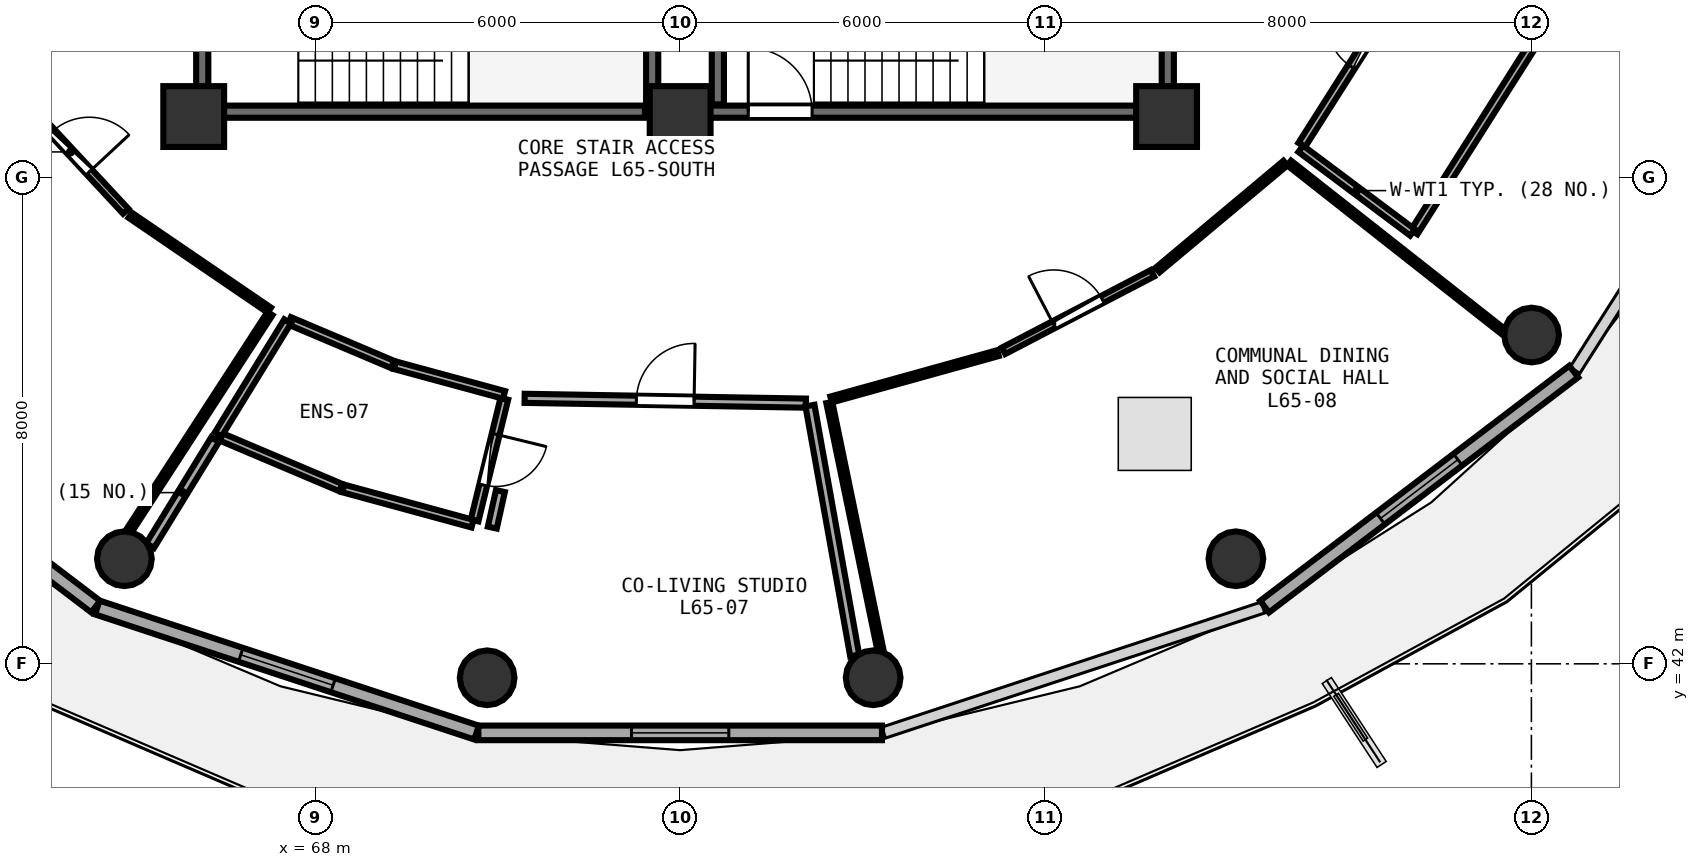
"""IFC4 building model, lengths in metres.
Left out: names, types, materials, properties, quantities, classifications, styles, units other than length and angle.
Written with IfcOpenShell. Run it as: python <this file> out.ifc"""

import sys

from ifc_helpers import new_model, si_unit, direction, frame, frame_2d, origin, origin_2d, place, context, subcontext, project, spatial, rectangle, circle, extrude, element, fill, save


model = new_model("IFC4")
c1 = context("Model", 3, precision=1e-05, world=origin(), true_north=direction((0.0, 1.0)))
c2 = subcontext(c1, "Body", "Model", "MODEL_VIEW")
j1 = project(units=[si_unit("LENGTHUNIT", "METRE"), si_unit("PLANEANGLEUNIT", "RADIAN")], contexts=[c1])
p1 = place(None, origin())
s1 = spatial("IfcSite", under=j1, at=p1, CompositionType="ELEMENT")
p2 = place(p1, origin())
s2 = spatial("IfcBuilding", under=s1, at=p2, CompositionType="ELEMENT")
p3 = place(p2, frame((0.0, 0.0, 256.2)))
s3 = spatial("IfcBuildingStorey", under=s2, at=p3, CompositionType="ELEMENT", Elevation=256.2)
for number, where, z_axis, x_axis in (
    (1, (66.0, 51.0, 0.0), (0.0, 0.0, 1.0), (1.0, 0.0, 0.0)),
    (2, (74.0, 51.0, 0.0), (0.0, 0.0, 1.0), (1.0, 0.0, 0.0)),
    (3, (82.0, 51.0, 0.0), (0.0, 0.0, 1.0), (1.0, 0.0, 0.0)),
):
    element("IfcColumn", number, at=place(p3, frame(where, z_axis=z_axis, x_axis=x_axis)), inside=s3, PredefinedType="PILASTER", context=c2, shape_type="SweptSolid", body=[
        extrude(rectangle(XDim=1.0, YDim=1.0, at=origin_2d()), origin(), (0.0, 0.0, 1.0), 3.75),
    ])
for number, where, z_axis, x_axis in (
    (4, (64.86, 43.728, 0.0), (0.0, 0.0, 1.0), (1.0, 0.0, 0.0)),
    (5, (70.826, 41.771, 0.0), (0.0, 0.0, 1.0), (1.0, 0.0, 0.0)),
    (6, (77.174, 41.771, 0.0), (0.0, 0.0, 1.0), (1.0, 0.0, 0.0)),
    (7, (83.14, 43.728, 0.0), (0.0, 0.0, 1.0), (1.0, 0.0, 0.0)),
    (8, (88.003, 47.407, 0.0), (0.0, 0.0, 1.0), (1.0, 0.0, 0.0)),
):
    element("IfcColumn", number, at=place(p3, frame(where, z_axis=z_axis, x_axis=x_axis)), inside=s3, PredefinedType="COLUMN", context=c2, shape_type="SweptSolid", body=[
        extrude(circle(Radius=0.45, at=origin_2d()), origin(), (0.0, 0.0, 1.0), 3.75),
    ])
p4 = place(p3, frame((59.304, 46.806, 0.0), z_axis=(0.0, 0.0, 1.0), x_axis=(0.796010444211, -0.605282886514, 0.0)))
e9 = element("IfcWall", 9, at=p4, inside=s3, PredefinedType="SOLIDWALL", context=c2, shape_type="SweptSolid", body=[
    extrude(rectangle(XDim=6.387, YDim=0.24, at=frame_2d((3.194, 0.0))), origin(), (0.0, 0.0, 1.0), 3.475),
])
p5 = place(p4, frame((2.394, 0.0, 0.85)))
e10 = element("IfcOpeningElement", 10, at=p5, cuts=e9, PredefinedType="OPENING", context=c2, shape_type="SweptSolid", body=[
    extrude(rectangle(XDim=1.6, YDim=1.45, at=frame_2d((0.8, 0.725))), frame((0.0, 0.13, 0.0), z_axis=(0.0, -1.0, 0.0), x_axis=(1.0, 0.0, 0.0)), (0.0, 0.0, 1.0), 0.26),
])
p6 = place(p3, frame((64.414, 42.927, 0.0), z_axis=(0.0, 0.0, 1.0), x_axis=(0.949663708393, -0.313271193954, 0.0)))
e11 = element("IfcWall", 11, at=p6, inside=s3, PredefinedType="SOLIDWALL", context=c2, shape_type="SweptSolid", body=[
    extrude(rectangle(XDim=6.568, YDim=0.24, at=frame_2d((3.284, 0.0))), origin(), (0.0, 0.0, 1.0), 3.475),
])
p7 = place(p6, frame((2.484, 0.0, 0.85)))
e12 = element("IfcOpeningElement", 12, at=p7, cuts=e11, PredefinedType="OPENING", context=c2, shape_type="SweptSolid", body=[
    extrude(rectangle(XDim=1.6, YDim=1.45, at=frame_2d((0.8, 0.725))), frame((0.0, 0.13, 0.0), z_axis=(0.0, -1.0, 0.0), x_axis=(1.0, 0.0, 0.0)), (0.0, 0.0, 1.0), 0.26),
])
p8 = place(p3, frame((70.681, 40.864, 0.0), z_axis=(0.0, 0.0, 1.0), x_axis=(1.0, 0.0, 0.0)))
e13 = element("IfcWall", 13, at=p8, inside=s3, PredefinedType="SOLIDWALL", context=c2, shape_type="SweptSolid", body=[
    extrude(rectangle(XDim=6.638, YDim=0.24, at=frame_2d((3.319, 0.0))), origin(), (0.0, 0.0, 1.0), 3.475),
])
p9 = place(p8, frame((2.519, 0.0, 0.85)))
e14 = element("IfcOpeningElement", 14, at=p9, cuts=e13, PredefinedType="OPENING", context=c2, shape_type="SweptSolid", body=[
    extrude(rectangle(XDim=1.6, YDim=1.45, at=frame_2d((0.8, 0.725))), frame((0.0, 0.13, 0.0), z_axis=(0.0, -1.0, 0.0), x_axis=(1.0, 0.0, 0.0)), (0.0, 0.0, 1.0), 0.26),
])
p10 = place(p3, frame((83.612, 42.94, 0.0), z_axis=(0.0, 0.0, 1.0), x_axis=(0.796010444211, 0.605282886514, 0.0)))
e15 = element("IfcWall", 15, at=p10, inside=s3, PredefinedType="SOLIDWALL", context=c2, shape_type="SweptSolid", body=[
    extrude(rectangle(XDim=6.387, YDim=0.24, at=frame_2d((3.194, 0.0))), origin(), (0.0, 0.0, 1.0), 3.475),
])
p11 = place(p10, frame((2.394, 0.0, 0.85)))
e16 = element("IfcOpeningElement", 16, at=p11, cuts=e15, PredefinedType="OPENING", context=c2, shape_type="SweptSolid", body=[
    extrude(rectangle(XDim=1.6, YDim=1.45, at=frame_2d((0.8, 0.725))), frame((0.0, 0.13, 0.0), z_axis=(0.0, -1.0, 0.0), x_axis=(1.0, 0.0, 0.0)), (0.0, 0.0, 1.0), 0.26),
])
p12 = place(p3, frame((74.0, 51.08, 0.0), z_axis=(0.0, 0.0, 1.0), x_axis=(1.0, 0.0, 0.0)))
e17 = element("IfcWall", 17, at=p12, inside=s3, PredefinedType="SHEAR", context=c2, shape_type="SweptSolid", body=[
    extrude(rectangle(XDim=7.9, YDim=0.2, at=frame_2d((3.95, 0.0))), origin(), (0.0, 0.0, 1.0), 3.49),
])
p13 = place(p12, frame((1.12, 0.0, 0.0)))
e18 = element("IfcOpeningElement", 18, at=p13, cuts=e17, PredefinedType="OPENING", context=c2, shape_type="SweptSolid", body=[
    extrude(rectangle(XDim=1.05, YDim=2.1, at=frame_2d((0.525, 1.05))), frame((0.0, 0.11, 0.0), z_axis=(0.0, -1.0, 0.0), x_axis=(1.0, 0.0, 0.0)), (0.0, 0.0, 1.0), 0.22),
])
for number, where, z_axis, x_axis in (
    (19, (82.02, 51.2, 0.0), (0.0, 0.0, 1.0), (0.0, 1.0, 0.0)),
    (20, (74.62, 54.27, 0.0), (0.0, 0.0, 1.0), (0.0, -1.0, 0.0)),
):
    element("IfcWall", number, at=place(p3, frame(where, z_axis=z_axis, x_axis=x_axis)), inside=s3, PredefinedType="SHEAR", context=c2, shape_type="SweptSolid", body=[
        extrude(rectangle(XDim=3.07, YDim=0.2, at=frame_2d((1.535, 0.0))), origin(), (0.0, 0.0, 1.0), 3.49),
    ])
p14 = place(p3, frame((66.26, 51.08, 0.0), z_axis=(0.0, 0.0, 1.0), x_axis=(1.0, 0.0, 0.0)))
e21 = element("IfcWall", 21, at=p14, inside=s3, PredefinedType="SHEAR", context=c2, shape_type="SweptSolid", body=[
    extrude(rectangle(XDim=7.16, YDim=0.2, at=frame_2d((3.58, 0.0))), origin(), (0.0, 0.0, 1.0), 3.49),
])
p15 = place(p3, frame((73.54, 51.2, 0.0), z_axis=(0.0, 0.0, 1.0), x_axis=(0.0, 1.0, 0.0)))
e22 = element("IfcWall", 22, at=p15, inside=s3, PredefinedType="SHEAR", context=c2, shape_type="SweptSolid", body=[
    extrude(rectangle(XDim=3.07, YDim=0.2, at=frame_2d((1.535, 0.0))), origin(), (0.0, 0.0, 1.0), 3.49),
])
p16 = place(p3, frame((66.14, 54.27, 0.0), z_axis=(0.0, 0.0, 1.0), x_axis=(0.0, -1.0, 0.0)))
e23 = element("IfcWall", 23, at=p16, inside=s3, PredefinedType="SHEAR", context=c2, shape_type="SweptSolid", body=[
    extrude(rectangle(XDim=3.07, YDim=0.2, at=frame_2d((1.535, 0.0))), origin(), (0.0, 0.0, 1.0), 3.49),
])
p17 = place(p16, frame((1.01, 0.0, 0.0)))
e24 = element("IfcOpeningElement", 24, at=p17, cuts=e23, PredefinedType="OPENING", context=c2, shape_type="SweptSolid", body=[
    extrude(rectangle(XDim=1.05, YDim=2.1, at=frame_2d((0.525, 1.05))), frame((0.0, 0.11, 0.0), z_axis=(0.0, -1.0, 0.0), x_axis=(1.0, 0.0, 0.0)), (0.0, 0.0, 1.0), 0.22),
])
p18 = place(p3, frame((63.067, 51.393, 0.0), z_axis=(0.0, 0.0, 1.0), x_axis=(0.681315269885, -0.731990097625, 0.0)))
e25 = element("IfcWall", 25, at=p18, inside=s3, PredefinedType="PARTITIONING", context=c2, shape_type="SweptSolid", body=[
    extrude(rectangle(XDim=2.664, YDim=0.12, at=frame_2d((1.332, 0.0))), origin(), (0.0, 0.0, 1.0), 3.075),
])
p19 = place(p18, frame((0.882, 0.0, 0.0)))
e26 = element("IfcOpeningElement", 26, at=p19, cuts=e25, PredefinedType="OPENING", context=c2, shape_type="SweptSolid", body=[
    extrude(rectangle(XDim=0.9, YDim=2.08, at=frame_2d((0.45, 1.04))), frame((0.0, 0.07, 0.0), z_axis=(0.0, -1.0, 0.0), x_axis=(1.0, 0.0, 0.0)), (0.0, 0.0, 1.0), 0.14),
])
p20 = place(p3, frame((71.109, 46.359, 0.0), z_axis=(0.0, 0.0, 1.0), x_axis=(-0.237485395018, -0.971391109262, 0.0)))
e27 = element("IfcWall", 27, at=p20, inside=s3, PredefinedType="PLUMBINGWALL", context=c2, shape_type="SweptSolid", body=[
    extrude(rectangle(XDim=2.06, YDim=0.13, at=frame_2d((1.03, 0.0))), origin(), (0.0, 0.0, 1.0), 3.175),
])
p21 = place(p20, frame((0.6, 0.0, 0.0)))
e28 = element("IfcOpeningElement", 28, at=p21, cuts=e27, PredefinedType="OPENING", context=c2, shape_type="SweptSolid", body=[
    extrude(rectangle(XDim=0.86, YDim=2.05, at=frame_2d((0.43, 1.025))), frame((0.0, 0.075, 0.0), z_axis=(0.0, -1.0, 0.0), x_axis=(1.0, 0.0, 0.0)), (0.0, 0.0, 1.0), 0.15),
])
p22 = place(p3, frame((71.442, 46.366, 0.0), z_axis=(0.0, 0.0, 1.0), x_axis=(0.99985475278, -0.017043278545, 0.0)))
e29 = element("IfcWall", 29, at=p22, inside=s3, PredefinedType="PARTITIONING", context=c2, shape_type="SweptSolid", body=[
    extrude(rectangle(XDim=4.627, YDim=0.15, at=frame_2d((2.313, 0.0))), origin(), (0.0, 0.0, 1.0), 3.075),
])
p23 = place(p22, frame((1.838, 0.0, 0.0)))
e30 = element("IfcOpeningElement", 30, at=p23, cuts=e29, PredefinedType="OPENING", context=c2, shape_type="SweptSolid", body=[
    extrude(rectangle(XDim=0.95, YDim=2.08, at=frame_2d((0.475, 1.04))), frame((0.0, 0.085, 0.0), z_axis=(0.0, -1.0, 0.0), x_axis=(1.0, 0.0, 0.0)), (0.0, 0.0, 1.0), 0.17),
])
p24 = place(p3, frame((79.319, 47.148, 0.0), z_axis=(0.0, 0.0, 1.0), x_axis=(0.887021247279, 0.461728607382, 0.0)))
e31 = element("IfcWall", 31, at=p24, inside=s3, PredefinedType="PARTITIONING", context=c2, shape_type="SweptSolid", body=[
    extrude(rectangle(XDim=2.761, YDim=0.12, at=frame_2d((1.38, 0.0))), origin(), (0.0, 0.0, 1.0), 3.235),
])
p25 = place(p24, frame((0.93, 0.0, 0.0)))
e32 = element("IfcOpeningElement", 32, at=p25, cuts=e31, PredefinedType="OPENING", context=c2, shape_type="SweptSolid", body=[
    extrude(rectangle(XDim=0.9, YDim=2.08, at=frame_2d((0.45, 1.04))), frame((0.0, 0.07, 0.0), z_axis=(0.0, -1.0, 0.0), x_axis=(1.0, 0.0, 0.0)), (0.0, 0.0, 1.0), 0.14),
])
p26 = place(p3, frame((84.223, 50.533, 0.0), z_axis=(0.0, 0.0, 1.0), x_axis=(0.536434868975, 0.84394172272, 0.0)))
e33 = element("IfcWall", 33, at=p26, inside=s3, PredefinedType="PLUMBINGWALL", context=c2, shape_type="SweptSolid", body=[
    extrude(rectangle(XDim=3.908, YDim=0.13, at=frame_2d((1.954, 0.0))), origin(), (0.0, 0.0, 1.0), 3.075),
])
p27 = place(p26, frame((1.524, 0.0, 0.0)))
e34 = element("IfcOpeningElement", 34, at=p27, cuts=e33, PredefinedType="OPENING", context=c2, shape_type="SweptSolid", body=[
    extrude(rectangle(XDim=0.86, YDim=2.05, at=frame_2d((0.43, 1.025))), frame((0.0, 0.075, 0.0), z_axis=(0.0, -1.0, 0.0), x_axis=(1.0, 0.0, 0.0)), (0.0, 0.0, 1.0), 0.15),
])
p28 = place(p3, frame((64.956, 49.376, 0.0), z_axis=(0.0, 0.0, 1.0), x_axis=(0.826087380575, -0.563542047814, 0.0)))
e35 = element("IfcWall", 35, at=p28, inside=s3, PredefinedType="PARTITIONING", context=c2, shape_type="SweptSolid", body=[
    extrude(rectangle(XDim=2.768, YDim=0.1, at=frame_2d((1.384, 0.0))), origin(), (0.0, 0.0, 1.0), 3.075),
])
p29 = place(p3, frame((67.254, 47.76, 0.0), z_axis=(0.0, 0.0, 1.0), x_axis=(-0.544234825024, -0.838932926539, 0.0)))
e36 = element("IfcWall", 36, at=p29, inside=s3, PredefinedType="PARTITIONING", context=c2, shape_type="SweptSolid", body=[
    extrude(rectangle(XDim=4.249, YDim=0.1, at=frame_2d((2.125, 0.0))), origin(), (0.0, 0.0, 1.0), 3.075),
])
p30 = place(p3, frame((67.573, 47.641, 0.0), z_axis=(0.0, 0.0, 1.0), x_axis=(0.920910556575, -0.389773968845, 0.0)))
e37 = element("IfcWall", 37, at=p30, inside=s3, PredefinedType="PLUMBINGWALL", context=c2, shape_type="SweptSolid", body=[
    extrude(rectangle(XDim=1.843, YDim=0.13, at=frame_2d((0.921, 0.0))), origin(), (0.0, 0.0, 1.0), 3.48),
])
p31 = place(p3, frame((69.308, 46.91, 0.0), z_axis=(0.0, 0.0, 1.0), x_axis=(0.96501774213, -0.262184586453, 0.0)))
e38 = element("IfcWall", 38, at=p31, inside=s3, PredefinedType="PLUMBINGWALL", context=c2, shape_type="SweptSolid", body=[
    extrude(rectangle(XDim=1.861, YDim=0.13, at=frame_2d((0.93, 0.0))), origin(), (0.0, 0.0, 1.0), 3.48),
])
p32 = place(p3, frame((70.586, 44.304, 0.0), z_axis=(0.0, 0.0, 1.0), x_axis=(-0.96480470919, 0.262967437384, 0.0)))
e39 = element("IfcWall", 39, at=p32, inside=s3, PredefinedType="PLUMBINGWALL", context=c2, shape_type="SweptSolid", body=[
    extrude(rectangle(XDim=2.204, YDim=0.13, at=frame_2d((1.102, 0.0))), origin(), (0.0, 0.0, 1.0), 3.48),
])
p33 = place(p3, frame((68.422, 44.897, 0.0), z_axis=(0.0, 0.0, 1.0), x_axis=(-0.920791207069, 0.390055833162, 0.0)))
e40 = element("IfcWall", 40, at=p33, inside=s3, PredefinedType="PLUMBINGWALL", context=c2, shape_type="SweptSolid", body=[
    extrude(rectangle(XDim=2.183, YDim=0.13, at=frame_2d((1.092, 0.0))), origin(), (0.0, 0.0, 1.0), 3.48),
])
p34 = place(p3, frame((66.404, 45.773, 0.0), z_axis=(0.0, 0.0, 1.0), x_axis=(0.523029155304, 0.85231479085, 0.0)))
e41 = element("IfcWall", 41, at=p34, inside=s3, PredefinedType="PLUMBINGWALL", context=c2, shape_type="SweptSolid", body=[
    extrude(rectangle(XDim=2.181, YDim=0.13, at=frame_2d((1.091, 0.0))), origin(), (0.0, 0.0, 1.0), 3.175),
])
p35 = place(p3, frame((76.135, 46.247, 0.0), z_axis=(0.0, 0.0, 1.0), x_axis=(0.176199339585, -0.984354505618, 0.0)))
e42 = element("IfcWall", 42, at=p35, inside=s3, PredefinedType="PARTITIONING", context=c2, shape_type="SweptSolid", body=[
    extrude(rectangle(XDim=4.176, YDim=0.15, at=frame_2d((2.088, 0.0))), origin(), (0.0, 0.0, 1.0), 3.075),
])
p36 = place(p3, frame((65.283, 43.944, 0.0), z_axis=(0.0, 0.0, 1.0), x_axis=(0.522864415557, 0.852415862677, 0.0)))
e43 = element("IfcWall", 43, at=p36, inside=s3, PredefinedType="PARTITIONING", context=c2, shape_type="SweptSolid", body=[
    extrude(rectangle(XDim=2.045, YDim=0.15, at=frame_2d((1.022, 0.0))), origin(), (0.0, 0.0, 1.0), 3.235),
])
p37 = place(p3, frame((70.911, 44.24, 0.0), z_axis=(0.0, 0.0, 1.0), x_axis=(0.216216290924, 0.976345489844, 0.0)))
e44 = element("IfcWall", 44, at=p37, inside=s3, PredefinedType="PARTITIONING", context=c2, shape_type="SweptSolid", body=[
    extrude(rectangle(XDim=0.615, YDim=0.15, at=frame_2d((0.308, 0.0))), origin(), (0.0, 0.0, 1.0), 3.48),
])
p38 = place(p3, frame((76.483, 46.347, 0.0), z_axis=(0.0, 0.0, 1.0), x_axis=(0.963478601256, 0.267785333659, 0.0)))
e45 = element("IfcWall", 45, at=p38, inside=s3, PredefinedType="PARTITIONING", context=c2, shape_type="SweptSolid", body=[
    extrude(rectangle(XDim=2.848, YDim=0.1, at=frame_2d((1.424, 0.0))), origin(), (0.0, 0.0, 1.0), 3.48),
])
p39 = place(p3, frame((81.852, 48.476, 0.0), z_axis=(0.0, 0.0, 1.0), x_axis=(0.767022676895, 0.641619991216, 0.0)))
e46 = element("IfcWall", 46, at=p39, inside=s3, PredefinedType="PARTITIONING", context=c2, shape_type="SweptSolid", body=[
    extrude(rectangle(XDim=2.741, YDim=0.1, at=frame_2d((1.371, 0.0))), origin(), (0.0, 0.0, 1.0), 3.075),
])
p40 = place(p3, frame((84.016, 50.235, 0.0), z_axis=(0.0, 0.0, 1.0), x_axis=(0.785736749878, -0.618561039745, 0.0)))
e47 = element("IfcWall", 47, at=p40, inside=s3, PredefinedType="PARTITIONING", context=c2, shape_type="SweptSolid", body=[
    extrude(rectangle(XDim=4.475, YDim=0.1, at=frame_2d((2.237, 0.0))), origin(), (0.0, 0.0, 1.0), 3.075),
])
p41 = place(p3, frame((77.293, 42.23, 0.0), z_axis=(0.0, 0.0, 1.0), x_axis=(-0.202308141573, 0.979321916355, 0.0)))
e48 = element("IfcWall", 48, at=p41, inside=s3, PredefinedType="PARTITIONING", context=c2, shape_type="SweptSolid", body=[
    extrude(rectangle(XDim=4.153, YDim=0.1, at=frame_2d((2.076, 0.0))), origin(), (0.0, 0.0, 1.0), 3.175),
])
p42 = place(p3, frame((88.606, 53.098, 0.0), z_axis=(0.0, 0.0, 1.0), x_axis=(-0.535433501212, -0.844577388864, 0.0)))
e49 = element("IfcWall", 49, at=p42, inside=s3, PredefinedType="PLUMBINGWALL", context=c2, shape_type="SweptSolid", body=[
    extrude(rectangle(XDim=4.735, YDim=0.13, at=frame_2d((2.368, 0.0))), origin(), (0.0, 0.0, 1.0), 3.075),
])
p43 = place(p3, frame((86.044, 49.094, 0.0), z_axis=(0.0, 0.0, 1.0), x_axis=(-0.800357274386, 0.599523338442, 0.0)))
e50 = element("IfcWall", 50, at=p43, inside=s3, PredefinedType="PLUMBINGWALL", context=c2, shape_type="SweptSolid", body=[
    extrude(rectangle(XDim=2.295, YDim=0.13, at=frame_2d((1.147, 0.0))), origin(), (0.0, 0.0, 1.0), 3.175),
])
p44 = place(p7, origin())
e51 = element("IfcWindow", 51, at=p44, inside=s3, PartitioningType="SINGLE_PANEL", PredefinedType="WINDOW", context=c2, shape_type="SweptSolid", body=[
    extrude(rectangle(XDim=1.6, YDim=1.45, at=frame_2d((0.8, 0.725))), frame((0.0, 0.03, 0.0), z_axis=(0.0, -1.0, 0.0), x_axis=(1.0, 0.0, 0.0)), (0.0, 0.0, 1.0), 0.06),
])
fill(e12, e51)
p45 = place(p9, origin())
e52 = element("IfcWindow", 52, at=p45, inside=s3, PartitioningType="SINGLE_PANEL", PredefinedType="WINDOW", context=c2, shape_type="SweptSolid", body=[
    extrude(rectangle(XDim=1.6, YDim=1.45, at=frame_2d((0.8, 0.725))), frame((0.0, 0.03, 0.0), z_axis=(0.0, -1.0, 0.0), x_axis=(1.0, 0.0, 0.0)), (0.0, 0.0, 1.0), 0.06),
])
fill(e14, e52)
p46 = place(p11, origin())
e53 = element("IfcWindow", 53, at=p46, inside=s3, PartitioningType="SINGLE_PANEL", PredefinedType="WINDOW", context=c2, shape_type="SweptSolid", body=[
    extrude(rectangle(XDim=1.6, YDim=1.45, at=frame_2d((0.8, 0.725))), frame((0.0, 0.03, 0.0), z_axis=(0.0, -1.0, 0.0), x_axis=(1.0, 0.0, 0.0)), (0.0, 0.0, 1.0), 0.06),
])
fill(e16, e53)
p47 = place(p13, origin())
e54 = element("IfcDoor", 54, at=p47, inside=s3, OperationType="SINGLE_SWING_LEFT", PredefinedType="DOOR", context=c2, shape_type="SweptSolid", body=[
    extrude(rectangle(XDim=1.05, YDim=2.1, at=frame_2d((0.525, 1.05))), frame((0.0, 0.025, 0.0), z_axis=(0.0, -1.0, 0.0), x_axis=(1.0, 0.0, 0.0)), (0.0, 0.0, 1.0), 0.05),
])
fill(e18, e54)
p48 = place(p19, origin())
e55 = element("IfcDoor", 55, at=p48, inside=s3, OperationType="SINGLE_SWING_RIGHT", PredefinedType="DOOR", context=c2, shape_type="SweptSolid", body=[
    extrude(rectangle(XDim=0.9, YDim=2.08, at=frame_2d((0.45, 1.04))), frame((0.0, 0.025, 0.0), z_axis=(0.0, -1.0, 0.0), x_axis=(1.0, 0.0, 0.0)), (0.0, 0.0, 1.0), 0.05),
])
fill(e26, e55)
p49 = place(p21, origin())
e56 = element("IfcDoor", 56, at=p49, inside=s3, OperationType="SINGLE_SWING_LEFT", PredefinedType="DOOR", context=c2, shape_type="SweptSolid", body=[
    extrude(rectangle(XDim=0.86, YDim=2.05, at=frame_2d((0.43, 1.025))), frame((0.0, 0.025, 0.0), z_axis=(0.0, -1.0, 0.0), x_axis=(1.0, 0.0, 0.0)), (0.0, 0.0, 1.0), 0.05),
])
fill(e28, e56)
p50 = place(p23, origin())
e57 = element("IfcDoor", 57, at=p50, inside=s3, OperationType="SINGLE_SWING_RIGHT", PredefinedType="DOOR", context=c2, shape_type="SweptSolid", body=[
    extrude(rectangle(XDim=0.95, YDim=2.08, at=frame_2d((0.475, 1.04))), frame((0.0, 0.025, 0.0), z_axis=(0.0, -1.0, 0.0), x_axis=(1.0, 0.0, 0.0)), (0.0, 0.0, 1.0), 0.05),
])
fill(e30, e57)
p51 = place(p25, origin())
e58 = element("IfcDoor", 58, at=p51, inside=s3, OperationType="SINGLE_SWING_LEFT", PredefinedType="DOOR", context=c2, shape_type="SweptSolid", body=[
    extrude(rectangle(XDim=0.9, YDim=2.08, at=frame_2d((0.45, 1.04))), frame((0.0, 0.025, 0.0), z_axis=(0.0, -1.0, 0.0), x_axis=(1.0, 0.0, 0.0)), (0.0, 0.0, 1.0), 0.05),
])
fill(e32, e58)
p52 = place(p27, origin())
e59 = element("IfcDoor", 59, at=p52, inside=s3, OperationType="SINGLE_SWING_RIGHT", PredefinedType="DOOR", context=c2, shape_type="SweptSolid", body=[
    extrude(rectangle(XDim=0.86, YDim=2.05, at=frame_2d((0.43, 1.025))), frame((0.0, 0.025, 0.0), z_axis=(0.0, -1.0, 0.0), x_axis=(1.0, 0.0, 0.0)), (0.0, 0.0, 1.0), 0.05),
])
fill(e34, e59)
save(model, sys.argv[1])
